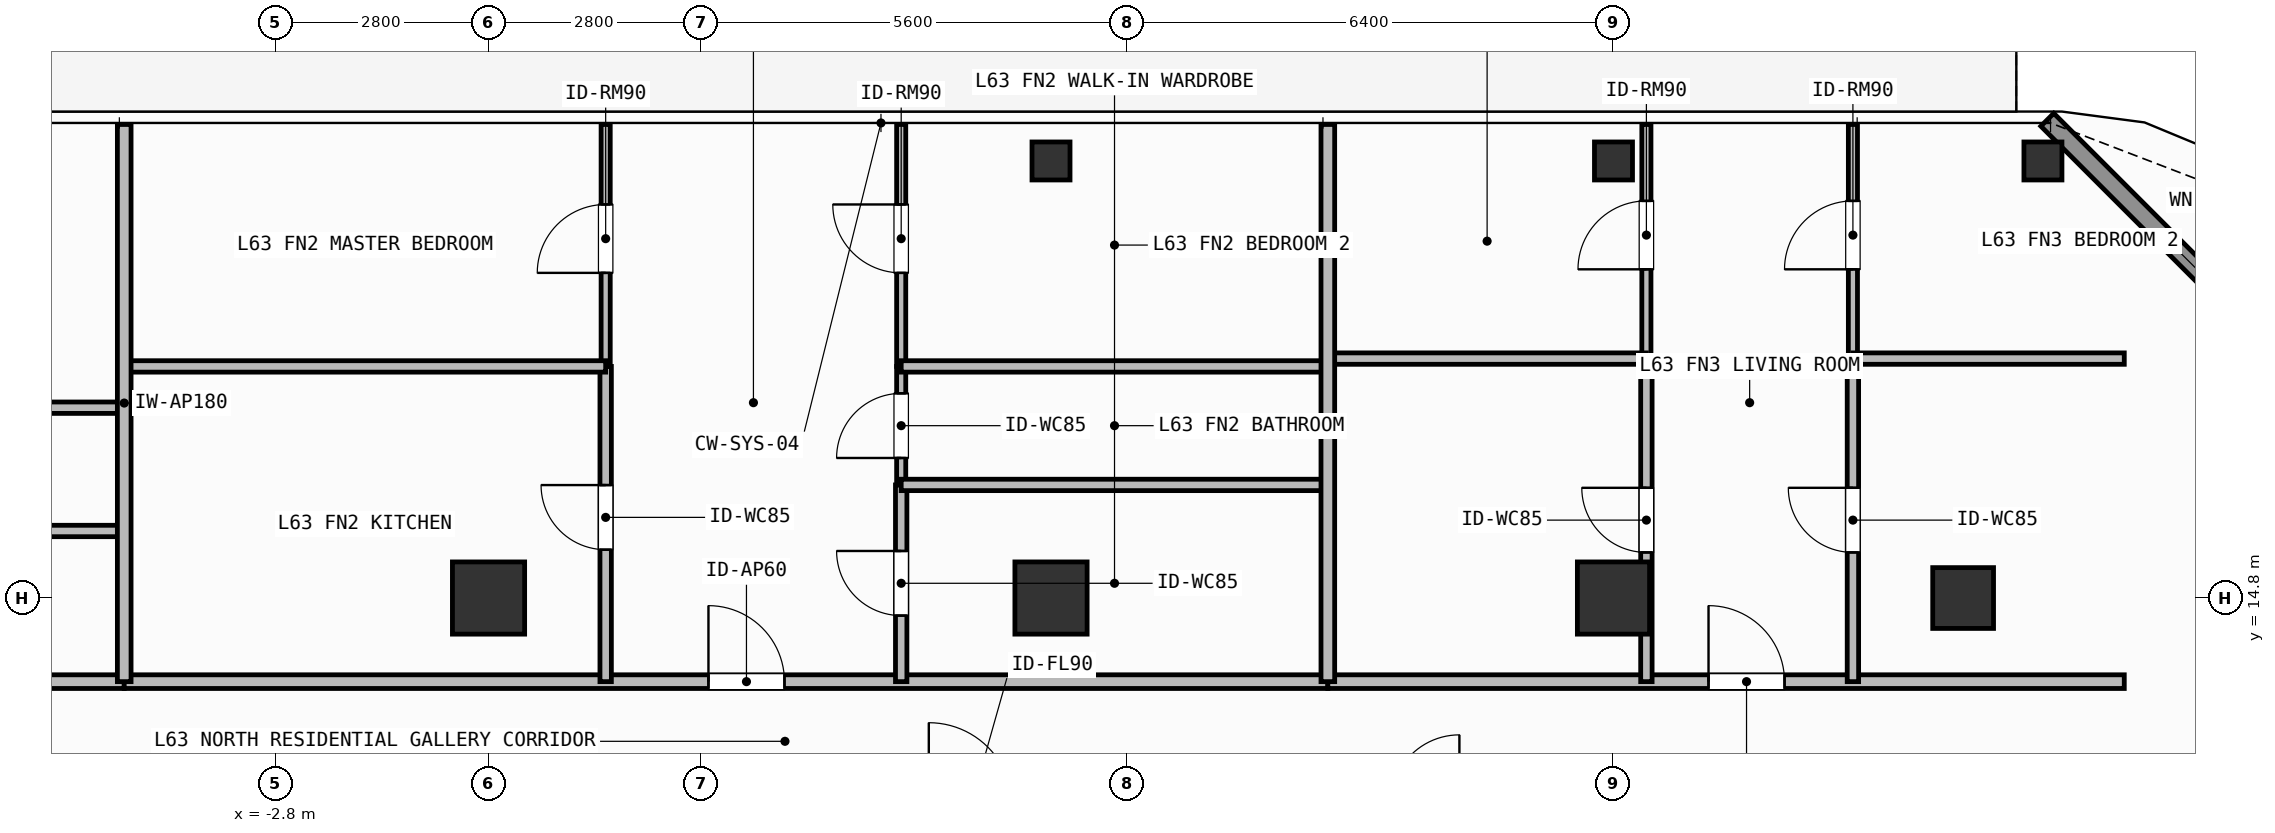
"""IFC4 building model, lengths in metres.
Left out: names, types, materials, properties, quantities, classifications, styles, units other than length and angle.
Written with IfcOpenShell. Run it as: python <this file> out.ifc"""

import sys

from ifc_helpers import new_model, si_unit, direction, frame, frame_2d, origin, origin_2d, place, context, subcontext, project, spatial, rectangle, hollow_rectangle, extrude, element, fill, save


model = new_model("IFC4")
c1 = context("Model", 3, precision=1e-05, world=origin(), true_north=direction((0.0, 1.0)))
c2 = subcontext(c1, "Body", "Model", "MODEL_VIEW")
j1 = project(units=[si_unit("LENGTHUNIT", "METRE"), si_unit("PLANEANGLEUNIT", "RADIAN")], contexts=[c1])
p1 = place(None, origin())
s1 = spatial("IfcSite", under=j1, at=p1, CompositionType="ELEMENT")
p2 = place(p1, origin())
s2 = spatial("IfcBuilding", under=s1, at=p2, CompositionType="ELEMENT")
p3 = place(p2, frame((0.0, 0.0, 258.6)))
s3 = spatial("IfcBuildingStorey", under=s2, at=p3, CompositionType="ELEMENT", Elevation=258.6)
for number, where, z_axis, x_axis in (
    (1, (0.0, 14.8, 0.0), (0.0, 0.0, 1.0), (1.0, 0.0, 0.0)),
    (2, (7.4, 14.8, 0.0), (0.0, 0.0, 1.0), (1.0, 0.0, 0.0)),
    (3, (14.8, 14.8, 0.0), (0.0, 0.0, 1.0), (1.0, 0.0, 0.0)),
):
    element("IfcColumn", number, at=place(p3, frame(where, z_axis=z_axis, x_axis=x_axis)), inside=s3, PredefinedType="COLUMN", context=c2, shape_type="SweptSolid", body=[
        extrude(rectangle(XDim=0.95, YDim=0.95, at=origin_2d()), origin(), (0.0, 0.0, 1.0), 3.9),
    ])
p4 = place(p3, frame((19.4, 14.8, 0.0), z_axis=(0.0, 0.0, 1.0), x_axis=(1.0, 0.0, 0.0)))
e4 = element("IfcColumn", 4, at=p4, inside=s3, PredefinedType="COLUMN", context=c2, shape_type="SweptSolid", body=[
    extrude(hollow_rectangle(XDim=0.8, YDim=0.8, WallThickness=0.036, at=origin_2d()), origin(), (0.0, 0.0, 1.0), 3.9),
])
for number, where, z_axis, x_axis in (
    (5, (20.45, 20.55, 0.0), (0.0, 0.0, 1.0), (1.0, 0.0, 0.0)),
    (6, (7.4, 20.55, 0.0), (0.0, 0.0, 1.0), (1.0, 0.0, 0.0)),
    (7, (14.8, 20.55, 0.0), (0.0, 0.0, 1.0), (1.0, 0.0, 0.0)),
):
    element("IfcColumn", number, at=place(p3, frame(where, z_axis=z_axis, x_axis=x_axis)), inside=s3, PredefinedType="COLUMN", context=c2, shape_type="SweptSolid", body=[
        extrude(hollow_rectangle(XDim=0.5, YDim=0.5, WallThickness=0.025, at=origin_2d()), origin(), (0.0, 0.0, 1.0), 3.9),
    ])
p5 = place(p3, frame((20.508, 21.092, 0.0), z_axis=(0.0, 0.0, 1.0), x_axis=(0.707126925818, -0.707086635981, 0.0)))
e8 = element("IfcWall", 8, at=p5, inside=s3, PredefinedType="SOLIDWALL", context=c2, shape_type="SweptSolid", body=[
    extrude(rectangle(XDim=6.06, YDim=0.24, at=frame_2d((3.03, 0.0))), origin(), (0.0, 0.0, 1.0), 3.68),
])
p6 = place(p5, frame((2.28, 0.0, 0.8)))
e9 = element("IfcOpeningElement", 9, at=p6, cuts=e8, PredefinedType="OPENING", context=c2, shape_type="SweptSolid", body=[
    extrude(rectangle(XDim=1.5, YDim=1.85, at=frame_2d((0.75, 0.925))), frame((0.0, 0.13, 0.0), z_axis=(0.0, -1.0, 0.0), x_axis=(1.0, 0.0, 0.0)), (0.0, 0.0, 1.0), 0.26),
])
p7 = place(p3, frame((-13.72, 13.7, 0.0), z_axis=(0.0, 0.0, 1.0), x_axis=(1.0, 0.0, 0.0)))
e10 = element("IfcWall", 10, at=p7, inside=s3, PredefinedType="PARTITIONING", context=c2, shape_type="SweptSolid", body=[
    extrude(rectangle(XDim=8.927, YDim=0.18, at=frame_2d((4.463, 0.0))), origin(), (0.0, 0.0, 1.0), 3.68),
])
p8 = place(p7, frame((1.752, 0.0, 0.0)))
e11 = element("IfcOpeningElement", 11, at=p8, cuts=e10, PredefinedType="OPENING", context=c2, shape_type="SweptSolid", body=[
    extrude(rectangle(XDim=1.0, YDim=2.2, at=frame_2d((0.5, 1.1))), frame((0.0, 0.1, 0.0), z_axis=(0.0, -1.0, 0.0), x_axis=(1.0, 0.0, 0.0)), (0.0, 0.0, 1.0), 0.2),
])
p9 = place(p3, frame((-4.793, 13.7, 0.0), z_axis=(0.0, 0.0, 1.0), x_axis=(1.0, 0.0, 0.0)))
e12 = element("IfcWall", 12, at=p9, inside=s3, PredefinedType="PARTITIONING", context=c2, shape_type="SweptSolid", body=[
    extrude(rectangle(XDim=15.835, YDim=0.18, at=frame_2d((7.917, 0.0))), origin(), (0.0, 0.0, 1.0), 3.68),
])
p10 = place(p9, frame((7.686, 0.0, 0.0)))
e13 = element("IfcOpeningElement", 13, at=p10, cuts=e12, PredefinedType="OPENING", context=c2, shape_type="SweptSolid", body=[
    extrude(rectangle(XDim=1.0, YDim=2.2, at=frame_2d((0.5, 1.1))), frame((0.0, 0.1, 0.0), z_axis=(0.0, -1.0, 0.0), x_axis=(1.0, 0.0, 0.0)), (0.0, 0.0, 1.0), 0.2),
])
p11 = place(p3, frame((1.541, 13.7, 0.0), z_axis=(0.0, 0.0, 1.0), x_axis=(0.0, 1.0, 0.0)))
e14 = element("IfcWall", 14, at=p11, inside=s3, PredefinedType="PARTITIONING", context=c2, shape_type="SweptSolid", body=[
    extrude(rectangle(XDim=4.147, YDim=0.15, at=frame_2d((2.073, 0.0))), origin(), (0.0, 0.0, 1.0), 3.68),
])
p12 = place(p11, frame((1.736, 0.0, 0.0)))
e15 = element("IfcOpeningElement", 15, at=p12, cuts=e14, PredefinedType="OPENING", context=c2, shape_type="SweptSolid", body=[
    extrude(rectangle(XDim=0.85, YDim=2.1, at=frame_2d((0.425, 1.05))), frame((0.0, 0.085, 0.0), z_axis=(0.0, -1.0, 0.0), x_axis=(1.0, 0.0, 0.0)), (0.0, 0.0, 1.0), 0.17),
])
p13 = place(p3, frame((1.541, 17.847, 0.0), z_axis=(0.0, 0.0, 1.0), x_axis=(0.0, 1.0, 0.0)))
e16 = element("IfcWall", 16, at=p13, inside=s3, PredefinedType="PARTITIONING", context=c2, shape_type="SweptSolid", body=[
    extrude(rectangle(XDim=3.183, YDim=0.12, at=frame_2d((1.592, 0.0))), origin(), (0.0, 0.0, 1.0), 3.68),
])
p14 = place(p13, frame((1.231, 0.0, 0.0)))
e17 = element("IfcOpeningElement", 17, at=p14, cuts=e16, PredefinedType="OPENING", context=c2, shape_type="SweptSolid", body=[
    extrude(rectangle(XDim=0.9, YDim=2.1, at=frame_2d((0.45, 1.05))), frame((0.0, 0.07, 0.0), z_axis=(0.0, -1.0, 0.0), x_axis=(1.0, 0.0, 0.0)), (0.0, 0.0, 1.0), 0.14),
])
p15 = place(p3, frame((5.429, 13.7, 0.0), z_axis=(0.0, 0.0, 1.0), x_axis=(0.0, 1.0, 0.0)))
e18 = element("IfcWall", 18, at=p15, inside=s3, PredefinedType="PARTITIONING", context=c2, shape_type="SweptSolid", body=[
    extrude(rectangle(XDim=2.588, YDim=0.15, at=frame_2d((1.294, 0.0))), origin(), (0.0, 0.0, 1.0), 3.68),
])
p16 = place(p15, frame((0.869, 0.0, 0.0)))
e19 = element("IfcOpeningElement", 19, at=p16, cuts=e18, PredefinedType="OPENING", context=c2, shape_type="SweptSolid", body=[
    extrude(rectangle(XDim=0.85, YDim=2.1, at=frame_2d((0.425, 1.05))), frame((0.0, 0.085, 0.0), z_axis=(0.0, -1.0, 0.0), x_axis=(1.0, 0.0, 0.0)), (0.0, 0.0, 1.0), 0.17),
])
p17 = place(p3, frame((5.429, 16.288, 0.0), z_axis=(0.0, 0.0, 1.0), x_axis=(0.0, 1.0, 0.0)))
e20 = element("IfcWall", 20, at=p17, inside=s3, PredefinedType="PARTITIONING", context=c2, shape_type="SweptSolid", body=[
    extrude(rectangle(XDim=1.559, YDim=0.12, at=frame_2d((0.779, 0.0))), origin(), (0.0, 0.0, 1.0), 3.68),
])
p18 = place(p17, frame((0.354, 0.0, 0.0)))
e21 = element("IfcOpeningElement", 21, at=p18, cuts=e20, PredefinedType="OPENING", context=c2, shape_type="SweptSolid", body=[
    extrude(rectangle(XDim=0.85, YDim=2.1, at=frame_2d((0.425, 1.05))), frame((0.0, 0.07, 0.0), z_axis=(0.0, -1.0, 0.0), x_axis=(1.0, 0.0, 0.0)), (0.0, 0.0, 1.0), 0.14),
])
p19 = place(p3, frame((5.429, 17.847, 0.0), z_axis=(0.0, 0.0, 1.0), x_axis=(0.0, 1.0, 0.0)))
e22 = element("IfcWall", 22, at=p19, inside=s3, PredefinedType="PARTITIONING", context=c2, shape_type="SweptSolid", body=[
    extrude(rectangle(XDim=3.183, YDim=0.12, at=frame_2d((1.592, 0.0))), origin(), (0.0, 0.0, 1.0), 3.68),
])
p20 = place(p19, frame((1.231, 0.0, 0.0)))
e23 = element("IfcOpeningElement", 23, at=p20, cuts=e22, PredefinedType="OPENING", context=c2, shape_type="SweptSolid", body=[
    extrude(rectangle(XDim=0.9, YDim=2.1, at=frame_2d((0.45, 1.05))), frame((0.0, 0.07, 0.0), z_axis=(0.0, -1.0, 0.0), x_axis=(1.0, 0.0, 0.0)), (0.0, 0.0, 1.0), 0.14),
])
p21 = place(p3, frame((11.042, 13.7, 0.0), z_axis=(0.0, 0.0, 1.0), x_axis=(1.0, 0.0, 0.0)))
e24 = element("IfcWall", 24, at=p21, inside=s3, PredefinedType="PARTITIONING", context=c2, shape_type="SweptSolid", body=[
    extrude(rectangle(XDim=10.478, YDim=0.18, at=frame_2d((5.239, 0.0))), origin(), (0.0, 0.0, 1.0), 3.68),
])
p22 = place(p21, frame((5.008, 0.0, 0.0)))
e25 = element("IfcOpeningElement", 25, at=p22, cuts=e24, PredefinedType="OPENING", context=c2, shape_type="SweptSolid", body=[
    extrude(rectangle(XDim=1.0, YDim=2.2, at=frame_2d((0.5, 1.1))), frame((0.0, 0.1, 0.0), z_axis=(0.0, -1.0, 0.0), x_axis=(1.0, 0.0, 0.0)), (0.0, 0.0, 1.0), 0.2),
])
p23 = place(p3, frame((15.233, 13.7, 0.0), z_axis=(0.0, 0.0, 1.0), x_axis=(0.0, 1.0, 0.0)))
e26 = element("IfcWall", 26, at=p23, inside=s3, PredefinedType="PARTITIONING", context=c2, shape_type="SweptSolid", body=[
    extrude(rectangle(XDim=4.25, YDim=0.15, at=frame_2d((2.125, 0.0))), origin(), (0.0, 0.0, 1.0), 3.68),
])
p24 = place(p23, frame((1.7, 0.0, 0.0)))
e27 = element("IfcOpeningElement", 27, at=p24, cuts=e26, PredefinedType="OPENING", context=c2, shape_type="SweptSolid", body=[
    extrude(rectangle(XDim=0.85, YDim=2.1, at=frame_2d((0.425, 1.05))), frame((0.0, 0.085, 0.0), z_axis=(0.0, -1.0, 0.0), x_axis=(1.0, 0.0, 0.0)), (0.0, 0.0, 1.0), 0.17),
])
p25 = place(p3, frame((15.233, 17.95, 0.0), z_axis=(0.0, 0.0, 1.0), x_axis=(0.0, 1.0, 0.0)))
e28 = element("IfcWall", 28, at=p25, inside=s3, PredefinedType="PARTITIONING", context=c2, shape_type="SweptSolid", body=[
    extrude(rectangle(XDim=3.08, YDim=0.12, at=frame_2d((1.54, 0.0))), origin(), (0.0, 0.0, 1.0), 3.68),
])
p26 = place(p25, frame((1.175, 0.0, 0.0)))
e29 = element("IfcOpeningElement", 29, at=p26, cuts=e28, PredefinedType="OPENING", context=c2, shape_type="SweptSolid", body=[
    extrude(rectangle(XDim=0.9, YDim=2.1, at=frame_2d((0.45, 1.05))), frame((0.0, 0.07, 0.0), z_axis=(0.0, -1.0, 0.0), x_axis=(1.0, 0.0, 0.0)), (0.0, 0.0, 1.0), 0.14),
])
p27 = place(p3, frame((17.95, 13.7, 0.0), z_axis=(0.0, 0.0, 1.0), x_axis=(0.0, 1.0, 0.0)))
e30 = element("IfcWall", 30, at=p27, inside=s3, PredefinedType="PARTITIONING", context=c2, shape_type="SweptSolid", body=[
    extrude(rectangle(XDim=4.25, YDim=0.15, at=frame_2d((2.125, 0.0))), origin(), (0.0, 0.0, 1.0), 3.68),
])
p28 = place(p27, frame((1.7, 0.0, 0.0)))
e31 = element("IfcOpeningElement", 31, at=p28, cuts=e30, PredefinedType="OPENING", context=c2, shape_type="SweptSolid", body=[
    extrude(rectangle(XDim=0.85, YDim=2.1, at=frame_2d((0.425, 1.05))), frame((0.0, 0.085, 0.0), z_axis=(0.0, -1.0, 0.0), x_axis=(1.0, 0.0, 0.0)), (0.0, 0.0, 1.0), 0.17),
])
p29 = place(p3, frame((17.95, 17.95, 0.0), z_axis=(0.0, 0.0, 1.0), x_axis=(0.0, 1.0, 0.0)))
e32 = element("IfcWall", 32, at=p29, inside=s3, PredefinedType="PARTITIONING", context=c2, shape_type="SweptSolid", body=[
    extrude(rectangle(XDim=3.08, YDim=0.12, at=frame_2d((1.54, 0.0))), origin(), (0.0, 0.0, 1.0), 3.68),
])
p30 = place(p29, frame((1.175, 0.0, 0.0)))
e33 = element("IfcOpeningElement", 33, at=p30, cuts=e32, PredefinedType="OPENING", context=c2, shape_type="SweptSolid", body=[
    extrude(rectangle(XDim=0.9, YDim=2.1, at=frame_2d((0.45, 1.05))), frame((0.0, 0.07, 0.0), z_axis=(0.0, -1.0, 0.0), x_axis=(1.0, 0.0, 0.0)), (0.0, 0.0, 1.0), 0.14),
])
for number, where, z_axis, x_axis in (
    (34, (-9.792, 15.682, 0.0), (0.0, 0.0, 1.0), (1.0, 0.0, 0.0)),
    (35, (-9.792, 17.304, 0.0), (0.0, 0.0, 1.0), (1.0, 0.0, 0.0)),
):
    element("IfcWall", number, at=place(p3, frame(where, z_axis=z_axis, x_axis=x_axis)), inside=s3, PredefinedType="PARTITIONING", context=c2, shape_type="SweptSolid", body=[
        extrude(rectangle(XDim=4.999, YDim=0.15, at=frame_2d((2.5, 0.0))), origin(), (0.0, 0.0, 1.0), 3.68),
    ])
p31 = place(p3, frame((-4.793, 17.847, 0.0), z_axis=(0.0, 0.0, 1.0), x_axis=(1.0, 0.0, 0.0)))
e36 = element("IfcWall", 36, at=p31, inside=s3, PredefinedType="PARTITIONING", context=c2, shape_type="SweptSolid", body=[
    extrude(rectangle(XDim=6.334, YDim=0.15, at=frame_2d((3.167, 0.0))), origin(), (0.0, 0.0, 1.0), 3.68),
])
for number, where, z_axis, x_axis in (
    (37, (5.429, 16.288, 0.0), (0.0, 0.0, 1.0), (1.0, 0.0, 0.0)),
    (38, (5.429, 17.847, 0.0), (0.0, 0.0, 1.0), (1.0, 0.0, 0.0)),
):
    element("IfcWall", number, at=place(p3, frame(where, z_axis=z_axis, x_axis=x_axis)), inside=s3, PredefinedType="PARTITIONING", context=c2, shape_type="SweptSolid", body=[
        extrude(rectangle(XDim=5.613, YDim=0.15, at=frame_2d((2.807, 0.0))), origin(), (0.0, 0.0, 1.0), 3.68),
    ])
p32 = place(p3, frame((-4.793, 13.7, 0.0), z_axis=(0.0, 0.0, 1.0), x_axis=(0.0, 1.0, 0.0)))
e39 = element("IfcWall", 39, at=p32, inside=s3, PredefinedType="PARTITIONING", context=c2, shape_type="SweptSolid", body=[
    extrude(rectangle(XDim=7.33, YDim=0.18, at=frame_2d((3.665, 0.0))), origin(), (0.0, 0.0, 1.0), 3.68),
])
p33 = place(p3, frame((11.042, 17.95, 0.0), z_axis=(0.0, 0.0, 1.0), x_axis=(1.0, 0.0, 0.0)))
e40 = element("IfcWall", 40, at=p33, inside=s3, PredefinedType="PARTITIONING", context=c2, shape_type="SweptSolid", body=[
    extrude(rectangle(XDim=4.191, YDim=0.15, at=frame_2d((2.095, 0.0))), origin(), (0.0, 0.0, 1.0), 3.68),
])
p34 = place(p3, frame((17.95, 17.95, 0.0), z_axis=(0.0, 0.0, 1.0), x_axis=(1.0, 0.0, 0.0)))
e41 = element("IfcWall", 41, at=p34, inside=s3, PredefinedType="PARTITIONING", context=c2, shape_type="SweptSolid", body=[
    extrude(rectangle(XDim=3.57, YDim=0.15, at=frame_2d((1.785, 0.0))), origin(), (0.0, 0.0, 1.0), 3.68),
])
p35 = place(p3, frame((11.042, 13.7, 0.0), z_axis=(0.0, 0.0, 1.0), x_axis=(0.0, 1.0, 0.0)))
e42 = element("IfcWall", 42, at=p35, inside=s3, PredefinedType="PARTITIONING", context=c2, shape_type="SweptSolid", body=[
    extrude(rectangle(XDim=7.33, YDim=0.18, at=frame_2d((3.665, 0.0))), origin(), (0.0, 0.0, 1.0), 3.42),
])
p36 = place(p6, origin())
e43 = element("IfcWindow", 43, at=p36, inside=s3, PartitioningType="SINGLE_PANEL", PredefinedType="WINDOW", context=c2, shape_type="SweptSolid", body=[
    extrude(rectangle(XDim=1.5, YDim=1.85, at=frame_2d((0.75, 0.925))), frame((0.0, 0.03, 0.0), z_axis=(0.0, -1.0, 0.0), x_axis=(1.0, 0.0, 0.0)), (0.0, 0.0, 1.0), 0.06),
])
fill(e9, e43)
p37 = place(p10, origin())
e44 = element("IfcDoor", 44, at=p37, inside=s3, OperationType="SINGLE_SWING_LEFT", PredefinedType="DOOR", context=c2, shape_type="SweptSolid", body=[
    extrude(rectangle(XDim=1.0, YDim=2.2, at=frame_2d((0.5, 1.1))), frame((0.0, 0.025, 0.0), z_axis=(0.0, -1.0, 0.0), x_axis=(1.0, 0.0, 0.0)), (0.0, 0.0, 1.0), 0.05),
])
fill(e13, e44)
p38 = place(p12, origin())
e45 = element("IfcDoor", 45, at=p38, inside=s3, OperationType="SINGLE_SWING_RIGHT", PredefinedType="DOOR", context=c2, shape_type="SweptSolid", body=[
    extrude(rectangle(XDim=0.85, YDim=2.1, at=frame_2d((0.425, 1.05))), frame((0.0, 0.025, 0.0), z_axis=(0.0, -1.0, 0.0), x_axis=(1.0, 0.0, 0.0)), (0.0, 0.0, 1.0), 0.05),
])
fill(e15, e45)
p39 = place(p14, origin())
e46 = element("IfcDoor", 46, at=p39, inside=s3, OperationType="SINGLE_SWING_LEFT", PredefinedType="DOOR", context=c2, shape_type="SweptSolid", body=[
    extrude(rectangle(XDim=0.9, YDim=2.1, at=frame_2d((0.45, 1.05))), frame((0.0, 0.025, 0.0), z_axis=(0.0, -1.0, 0.0), x_axis=(1.0, 0.0, 0.0)), (0.0, 0.0, 1.0), 0.05),
])
fill(e17, e46)
p40 = place(p16, origin())
e47 = element("IfcDoor", 47, at=p40, inside=s3, OperationType="SINGLE_SWING_RIGHT", PredefinedType="DOOR", context=c2, shape_type="SweptSolid", body=[
    extrude(rectangle(XDim=0.85, YDim=2.1, at=frame_2d((0.425, 1.05))), frame((0.0, 0.025, 0.0), z_axis=(0.0, -1.0, 0.0), x_axis=(1.0, 0.0, 0.0)), (0.0, 0.0, 1.0), 0.05),
])
fill(e19, e47)
p41 = place(p18, origin())
e48 = element("IfcDoor", 48, at=p41, inside=s3, OperationType="SINGLE_SWING_LEFT", PredefinedType="DOOR", context=c2, shape_type="SweptSolid", body=[
    extrude(rectangle(XDim=0.85, YDim=2.1, at=frame_2d((0.425, 1.05))), frame((0.0, 0.025, 0.0), z_axis=(0.0, -1.0, 0.0), x_axis=(1.0, 0.0, 0.0)), (0.0, 0.0, 1.0), 0.05),
])
fill(e21, e48)
p42 = place(p20, origin())
e49 = element("IfcDoor", 49, at=p42, inside=s3, OperationType="SINGLE_SWING_RIGHT", PredefinedType="DOOR", context=c2, shape_type="SweptSolid", body=[
    extrude(rectangle(XDim=0.9, YDim=2.1, at=frame_2d((0.45, 1.05))), frame((0.0, 0.025, 0.0), z_axis=(0.0, -1.0, 0.0), x_axis=(1.0, 0.0, 0.0)), (0.0, 0.0, 1.0), 0.05),
])
fill(e23, e49)
p43 = place(p22, origin())
e50 = element("IfcDoor", 50, at=p43, inside=s3, OperationType="SINGLE_SWING_LEFT", PredefinedType="DOOR", context=c2, shape_type="SweptSolid", body=[
    extrude(rectangle(XDim=1.0, YDim=2.2, at=frame_2d((0.5, 1.1))), frame((0.0, 0.025, 0.0), z_axis=(0.0, -1.0, 0.0), x_axis=(1.0, 0.0, 0.0)), (0.0, 0.0, 1.0), 0.05),
])
fill(e25, e50)
p44 = place(p24, origin())
e51 = element("IfcDoor", 51, at=p44, inside=s3, OperationType="SINGLE_SWING_RIGHT", PredefinedType="DOOR", context=c2, shape_type="SweptSolid", body=[
    extrude(rectangle(XDim=0.85, YDim=2.1, at=frame_2d((0.425, 1.05))), frame((0.0, 0.025, 0.0), z_axis=(0.0, -1.0, 0.0), x_axis=(1.0, 0.0, 0.0)), (0.0, 0.0, 1.0), 0.05),
])
fill(e27, e51)
p45 = place(p26, origin())
e52 = element("IfcDoor", 52, at=p45, inside=s3, OperationType="SINGLE_SWING_LEFT", PredefinedType="DOOR", context=c2, shape_type="SweptSolid", body=[
    extrude(rectangle(XDim=0.9, YDim=2.1, at=frame_2d((0.45, 1.05))), frame((0.0, 0.025, 0.0), z_axis=(0.0, -1.0, 0.0), x_axis=(1.0, 0.0, 0.0)), (0.0, 0.0, 1.0), 0.05),
])
fill(e29, e52)
p46 = place(p28, origin())
e53 = element("IfcDoor", 53, at=p46, inside=s3, OperationType="SINGLE_SWING_RIGHT", PredefinedType="DOOR", context=c2, shape_type="SweptSolid", body=[
    extrude(rectangle(XDim=0.85, YDim=2.1, at=frame_2d((0.425, 1.05))), frame((0.0, 0.025, 0.0), z_axis=(0.0, -1.0, 0.0), x_axis=(1.0, 0.0, 0.0)), (0.0, 0.0, 1.0), 0.05),
])
fill(e31, e53)
p47 = place(p30, origin())
e54 = element("IfcDoor", 54, at=p47, inside=s3, OperationType="SINGLE_SWING_LEFT", PredefinedType="DOOR", context=c2, shape_type="SweptSolid", body=[
    extrude(rectangle(XDim=0.9, YDim=2.1, at=frame_2d((0.45, 1.05))), frame((0.0, 0.025, 0.0), z_axis=(0.0, -1.0, 0.0), x_axis=(1.0, 0.0, 0.0)), (0.0, 0.0, 1.0), 0.05),
])
fill(e33, e54)
save(model, sys.argv[1])
